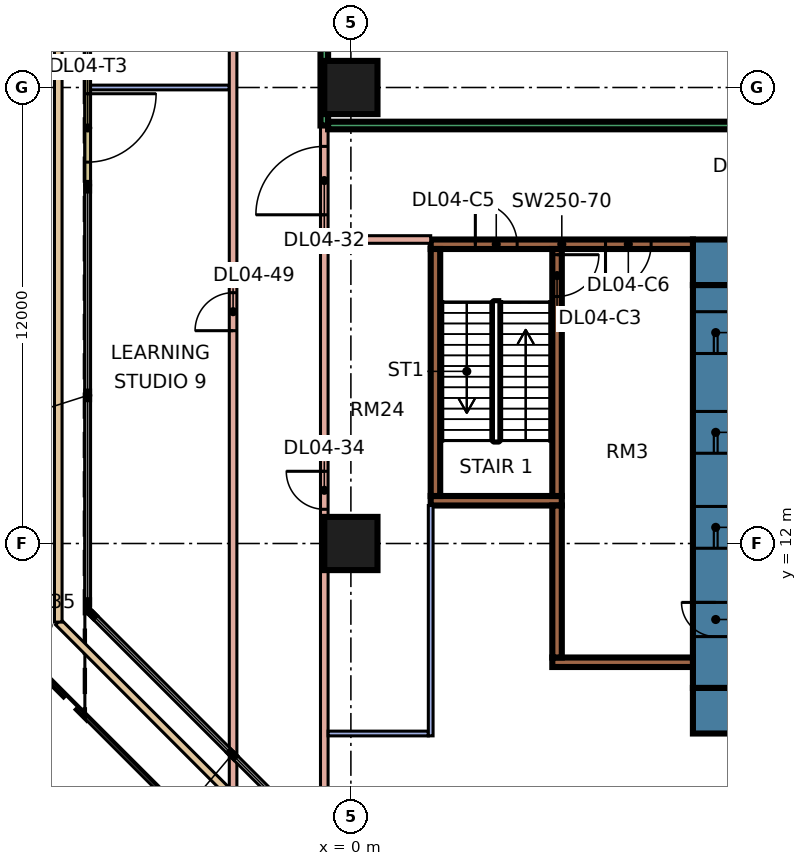
"""IFC4 building model, lengths in metres.
Left out: names, types, materials, properties, quantities, classifications, styles, units other than length and angle.
Written with IfcOpenShell. Run it as: python <this file> out.ifc"""

import sys

from ifc_helpers import new_model, si_unit, direction, frame, frame_2d, origin, origin_2d, place, context, subcontext, project, spatial, rectangle, extrude, element, fill, save


model = new_model("IFC4")
c1 = context("Model", 3, precision=1e-05, world=origin(), true_north=direction((0.0, 1.0)))
c2 = subcontext(c1, "Body", "Model", "MODEL_VIEW")
j1 = project(units=[si_unit("LENGTHUNIT", "METRE"), si_unit("PLANEANGLEUNIT", "RADIAN")], contexts=[c1])
p1 = place(None, origin())
s1 = spatial("IfcSite", under=j1, at=p1, CompositionType="ELEMENT")
p2 = place(p1, origin())
s2 = spatial("IfcBuilding", under=s1, at=p2, CompositionType="ELEMENT")
p3 = place(p2, frame((0.0, 0.0, 21.6)))
s3 = spatial("IfcBuildingStorey", under=s2, at=p3, CompositionType="ELEMENT", Elevation=21.6)
for number, where, z_axis, x_axis in (
    (1, (0.0, 12.0, 0.0), (0.0, 0.0, 1.0), (1.0, 0.0, 0.0)),
    (2, (0.0, 24.0, 0.0), (0.0, 0.0, 1.0), (1.0, 0.0, 0.0)),
):
    element("IfcColumn", number, at=place(p3, frame(where, z_axis=z_axis, x_axis=x_axis)), inside=s3, PredefinedType="COLUMN", context=c2, shape_type="SweptSolid", body=[
        extrude(rectangle(XDim=1.4, YDim=1.4, at=origin_2d()), origin(), (0.0, 0.0, 1.0), 4.8),
    ])
p4 = place(p3, frame((9.0, 7.6, 0.0), z_axis=(0.0, 0.0, 1.0), x_axis=(1.0, 0.0, 0.0)))
e3 = element("IfcWall", 3, at=p4, inside=s3, PredefinedType="SHEAR", context=c2, shape_type="SweptSolid", body=[
    extrude(rectangle(XDim=25.0, YDim=1.2, at=frame_2d((12.5, 0.0))), origin(), (0.0, 0.0, 1.0), 4.8),
])
p5 = place(p3, frame((9.0, 19.4, 0.0), z_axis=(0.0, 0.0, 1.0), x_axis=(1.0, 0.0, 0.0)))
e4 = element("IfcWall", 4, at=p5, inside=s3, PredefinedType="SHEAR", context=c2, shape_type="SweptSolid", body=[
    extrude(rectangle(XDim=25.0, YDim=1.2, at=frame_2d((12.5, 0.0))), origin(), (0.0, 0.0, 1.0), 4.8),
])
p6 = place(p5, frame((19.1, 0.0, 0.0)))
e5 = element("IfcOpeningElement", 5, at=p6, cuts=e4, PredefinedType="OPENING", context=c2, shape_type="SweptSolid", body=[
    extrude(rectangle(XDim=1.8, YDim=2.4, at=frame_2d((0.9, 1.2))), frame((0.0, 0.61, 0.0), z_axis=(0.0, -1.0, 0.0), x_axis=(1.0, 0.0, 0.0)), (0.0, 0.0, 1.0), 1.22),
])
p7 = place(p3, frame((9.6, 8.2, 0.0), z_axis=(0.0, 0.0, 1.0), x_axis=(0.0, 1.0, 0.0)))
e6 = element("IfcWall", 6, at=p7, inside=s3, PredefinedType="SHEAR", context=c2, shape_type="SweptSolid", body=[
    extrude(rectangle(XDim=10.6, YDim=1.2, at=frame_2d((5.3, 0.0))), origin(), (0.0, 0.0, 1.0), 4.8),
])
p8 = place(p7, frame((3.675, 0.0, 0.0)))
e7 = element("IfcOpeningElement", 7, at=p8, cuts=e6, PredefinedType="OPENING", context=c2, shape_type="SweptSolid", body=[
    extrude(rectangle(XDim=1.1, YDim=2.2, at=frame_2d((0.55, 1.1))), frame((0.0, 0.61, 0.0), z_axis=(0.0, -1.0, 0.0), x_axis=(1.0, 0.0, 0.0)), (0.0, 0.0, 1.0), 1.22),
])
p9 = place(p7, frame((6.175, 0.0, 0.0)))
e8 = element("IfcOpeningElement", 8, at=p9, cuts=e6, PredefinedType="OPENING", context=c2, shape_type="SweptSolid", body=[
    extrude(rectangle(XDim=1.1, YDim=2.2, at=frame_2d((0.55, 1.1))), frame((0.0, 0.61, 0.0), z_axis=(0.0, -1.0, 0.0), x_axis=(1.0, 0.0, 0.0)), (0.0, 0.0, 1.0), 1.22),
])
p10 = place(p7, frame((8.8, 0.0, 0.0)))
e9 = element("IfcOpeningElement", 9, at=p10, cuts=e6, PredefinedType="OPENING", context=c2, shape_type="SweptSolid", body=[
    extrude(rectangle(XDim=1.1, YDim=2.2, at=frame_2d((0.55, 1.1))), frame((0.0, 0.61, 0.0), z_axis=(0.0, -1.0, 0.0), x_axis=(1.0, 0.0, 0.0)), (0.0, 0.0, 1.0), 1.22),
])
p11 = place(p7, frame((1.35, 0.0, 0.0)))
e10 = element("IfcOpeningElement", 10, at=p11, cuts=e6, PredefinedType="OPENING", context=c2, shape_type="SweptSolid", body=[
    extrude(rectangle(XDim=0.9, YDim=2.1, at=frame_2d((0.45, 1.05))), frame((0.0, 0.61, 0.0), z_axis=(0.0, -1.0, 0.0), x_axis=(1.0, 0.0, 0.0)), (0.0, 0.0, 1.0), 1.22),
])
p12 = place(p3, frame((2.1, 19.875, 0.0), z_axis=(0.0, 0.0, 1.0), x_axis=(1.0, 0.0, 0.0)))
e11 = element("IfcWall", 11, at=p12, inside=s3, PredefinedType="SHEAR", context=c2, shape_type="SweptSolid", body=[
    extrude(rectangle(XDim=6.9, YDim=0.25, at=frame_2d((3.45, 0.0))), origin(), (0.0, 0.0, 1.0), 4.8),
])
p13 = place(p12, frame((1.175, 0.0, 0.0)))
e12 = element("IfcOpeningElement", 12, at=p13, cuts=e11, PredefinedType="OPENING", context=c2, shape_type="SweptSolid", body=[
    extrude(rectangle(XDim=1.1, YDim=2.2, at=frame_2d((0.55, 1.1))), frame((0.0, 0.135, 0.0), z_axis=(0.0, -1.0, 0.0), x_axis=(1.0, 0.0, 0.0)), (0.0, 0.0, 1.0), 0.27),
])
p14 = place(p12, frame((4.6, 0.0, 0.0)))
e13 = element("IfcOpeningElement", 13, at=p14, cuts=e11, PredefinedType="OPENING", context=c2, shape_type="SweptSolid", body=[
    extrude(rectangle(XDim=1.2, YDim=2.2, at=frame_2d((0.6, 1.1))), frame((0.0, 0.135, 0.0), z_axis=(0.0, -1.0, 0.0), x_axis=(1.0, 0.0, 0.0)), (0.0, 0.0, 1.0), 0.27),
])
p15 = place(p3, frame((2.1, 13.125, 0.0), z_axis=(0.0, 0.0, 1.0), x_axis=(1.0, 0.0, 0.0)))
e14 = element("IfcWall", 14, at=p15, inside=s3, PredefinedType="SHEAR", context=c2, shape_type="SweptSolid", body=[
    extrude(rectangle(XDim=3.45, YDim=0.25, at=frame_2d((1.725, 0.0))), origin(), (0.0, 0.0, 1.0), 4.8),
])
p16 = place(p3, frame((2.225, 13.25, 0.0), z_axis=(0.0, 0.0, 1.0), x_axis=(0.0, 1.0, 0.0)))
e15 = element("IfcWall", 15, at=p16, inside=s3, PredefinedType="SHEAR", context=c2, shape_type="SweptSolid", body=[
    extrude(rectangle(XDim=6.5, YDim=0.25, at=frame_2d((3.25, 0.0))), origin(), (0.0, 0.0, 1.0), 4.8),
])
p17 = place(p3, frame((5.425, 13.25, 0.0), z_axis=(0.0, 0.0, 1.0), x_axis=(0.0, 1.0, 0.0)))
e16 = element("IfcWall", 16, at=p17, inside=s3, PredefinedType="SHEAR", context=c2, shape_type="SweptSolid", body=[
    extrude(rectangle(XDim=6.5, YDim=0.25, at=frame_2d((3.25, 0.0))), origin(), (0.0, 0.0, 1.0), 4.8),
])
p18 = place(p17, frame((5.25, 0.0, 0.0)))
e17 = element("IfcOpeningElement", 17, at=p18, cuts=e16, PredefinedType="OPENING", context=c2, shape_type="SweptSolid", body=[
    extrude(rectangle(XDim=1.1, YDim=2.2, at=frame_2d((0.55, 1.1))), frame((0.0, 0.135, 0.0), z_axis=(0.0, -1.0, 0.0), x_axis=(1.0, 0.0, 0.0)), (0.0, 0.0, 1.0), 0.27),
])
p19 = place(p3, frame((5.3, 8.875, 0.0), z_axis=(0.0, 0.0, 1.0), x_axis=(1.0, 0.0, 0.0)))
e18 = element("IfcWall", 18, at=p19, inside=s3, PredefinedType="SHEAR", context=c2, shape_type="SweptSolid", body=[
    extrude(rectangle(XDim=3.7, YDim=0.25, at=frame_2d((1.85, 0.0))), origin(), (0.0, 0.0, 1.0), 4.8),
])
p20 = place(p3, frame((5.425, 9.0, 0.0), z_axis=(0.0, 0.0, 1.0), x_axis=(0.0, 1.0, 0.0)))
e19 = element("IfcWall", 19, at=p20, inside=s3, PredefinedType="SHEAR", context=c2, shape_type="SweptSolid", body=[
    extrude(rectangle(XDim=4.0, YDim=0.25, at=frame_2d((2.0, 0.0))), origin(), (0.0, 0.0, 1.0), 4.8),
])
p21 = place(p3, frame((-6.925, 24.436, 0.0), z_axis=(0.0, 0.0, 1.0), x_axis=(0.0, -1.0, 0.0)))
e20 = element("IfcWall", 20, at=p21, inside=s3, PredefinedType="SOLIDWALL", context=c2, shape_type="SweptSolid", body=[
    extrude(rectangle(XDim=3.0, YDim=0.15, at=frame_2d((1.5, 0.0))), origin(), (0.0, 0.0, 1.0), 4.4),
])
p22 = place(p21, frame((0.6, 0.0, 0.0)))
e21 = element("IfcOpeningElement", 21, at=p22, cuts=e20, PredefinedType="OPENING", context=c2, shape_type="SweptSolid", body=[
    extrude(rectangle(XDim=1.8, YDim=2.4, at=frame_2d((0.9, 1.2))), frame((0.0, 0.085, 0.0), z_axis=(0.0, -1.0, 0.0), x_axis=(1.0, 0.0, 0.0)), (0.0, 0.0, 1.0), 0.17),
])
p23 = place(p3, frame((9.932, -7.7, 0.0), z_axis=(0.0, 0.0, 1.0), x_axis=(-0.707106781187, 0.707106781187, 0.0)))
e22 = element("IfcWall", 22, at=p23, inside=s3, PredefinedType="PARAPET", context=c2, shape_type="SweptSolid", body=[
    extrude(rectangle(XDim=24.935, YDim=0.2, at=frame_2d((12.468, 0.0))), origin(), (0.0, 0.0, 1.0), 0.5),
])
p24 = place(p3, frame((-7.7, 9.932, 0.0), z_axis=(0.0, 0.0, 1.0), x_axis=(0.0, 1.0, 0.0)))
e23 = element("IfcWall", 23, at=p24, inside=s3, PredefinedType="PARAPET", context=c2, shape_type="SweptSolid", body=[
    extrude(rectangle(XDim=54.136, YDim=0.2, at=frame_2d((27.068, 0.0))), origin(), (0.0, 0.0, 1.0), 0.5),
])
p25 = place(p3, frame((-6.851, 24.0, 0.0), z_axis=(0.0, 0.0, 1.0), x_axis=(1.0, 0.0, 0.0)))
e24 = element("IfcWall", 24, at=p25, inside=s3, PredefinedType="PARTITIONING", context=c2, shape_type="SweptSolid", body=[
    extrude(rectangle(XDim=3.651, YDim=0.125, at=frame_2d((1.826, 0.0))), origin(), (0.0, 0.0, 1.0), 4.4),
])
p26 = place(p3, frame((-3.1, 5.473, 0.0), z_axis=(0.0, 0.0, 1.0), x_axis=(0.0, 1.0, 0.0)))
e25 = element("IfcWall", 25, at=p26, inside=s3, PredefinedType="PARTITIONING", context=c2, shape_type="SweptSolid", body=[
    extrude(rectangle(XDim=60.727, YDim=0.2, at=frame_2d((30.363, 0.0))), origin(), (0.0, 0.0, 1.0), 4.4),
])
p27 = place(p26, frame((12.127, 0.0, 0.0)))
e26 = element("IfcOpeningElement", 26, at=p27, cuts=e25, PredefinedType="OPENING", context=c2, shape_type="SweptSolid", body=[
    extrude(rectangle(XDim=1.0, YDim=2.1, at=frame_2d((0.5, 1.05))), frame((0.0, 0.11, 0.0), z_axis=(0.0, -1.0, 0.0), x_axis=(1.0, 0.0, 0.0)), (0.0, 0.0, 1.0), 0.22),
])
p28 = place(p26, frame((24.127, 0.0, 0.0)))
e27 = element("IfcOpeningElement", 27, at=p28, cuts=e25, PredefinedType="OPENING", context=c2, shape_type="SweptSolid", body=[
    extrude(rectangle(XDim=1.0, YDim=2.1, at=frame_2d((0.5, 1.05))), frame((0.0, 0.11, 0.0), z_axis=(0.0, -1.0, 0.0), x_axis=(1.0, 0.0, 0.0)), (0.0, 0.0, 1.0), 0.22),
])
p29 = place(p26, frame((34.627, 0.0, 0.0)))
e28 = element("IfcOpeningElement", 28, at=p29, cuts=e25, PredefinedType="OPENING", context=c2, shape_type="SweptSolid", body=[
    extrude(rectangle(XDim=1.0, YDim=2.1, at=frame_2d((0.5, 1.05))), frame((0.0, 0.11, 0.0), z_axis=(0.0, -1.0, 0.0), x_axis=(1.0, 0.0, 0.0)), (0.0, 0.0, 1.0), 0.22),
])
p30 = place(p26, frame((43.627, 0.0, 0.0)))
e29 = element("IfcOpeningElement", 29, at=p30, cuts=e25, PredefinedType="OPENING", context=c2, shape_type="SweptSolid", body=[
    extrude(rectangle(XDim=1.0, YDim=2.1, at=frame_2d((0.5, 1.05))), frame((0.0, 0.11, 0.0), z_axis=(0.0, -1.0, 0.0), x_axis=(1.0, 0.0, 0.0)), (0.0, 0.0, 1.0), 0.22),
])
p31 = place(p26, frame((52.627, 0.0, 0.0)))
e30 = element("IfcOpeningElement", 30, at=p31, cuts=e25, PredefinedType="OPENING", context=c2, shape_type="SweptSolid", body=[
    extrude(rectangle(XDim=1.0, YDim=2.1, at=frame_2d((0.5, 1.05))), frame((0.0, 0.11, 0.0), z_axis=(0.0, -1.0, 0.0), x_axis=(1.0, 0.0, 0.0)), (0.0, 0.0, 1.0), 0.22),
])
p32 = place(p3, frame((-0.7, 3.073, 0.0), z_axis=(0.0, 0.0, 1.0), x_axis=(0.0, 1.0, 0.0)))
e31 = element("IfcWall", 31, at=p32, inside=s3, PredefinedType="PARTITIONING", context=c2, shape_type="SweptSolid", body=[
    extrude(rectangle(XDim=19.927, YDim=0.2, at=frame_2d((9.963, 0.0))), origin(), (0.0, 0.0, 1.0), 4.4),
])
p33 = place(p32, frame((17.577, 0.0, 0.0)))
e32 = element("IfcOpeningElement", 32, at=p33, cuts=e31, PredefinedType="OPENING", context=c2, shape_type="SweptSolid", body=[
    extrude(rectangle(XDim=1.8, YDim=2.1, at=frame_2d((0.9, 1.05))), frame((0.0, 0.11, 0.0), z_axis=(0.0, -1.0, 0.0), x_axis=(1.0, 0.0, 0.0)), (0.0, 0.0, 1.0), 0.22),
])
p34 = place(p32, frame((9.827, 0.0, 0.0)))
e33 = element("IfcOpeningElement", 33, at=p34, cuts=e31, PredefinedType="OPENING", context=c2, shape_type="SweptSolid", body=[
    extrude(rectangle(XDim=1.0, YDim=2.1, at=frame_2d((0.5, 1.05))), frame((0.0, 0.11, 0.0), z_axis=(0.0, -1.0, 0.0), x_axis=(1.0, 0.0, 0.0)), (0.0, 0.0, 1.0), 0.22),
])
p35 = place(p3, frame((-0.7, 23.0, 0.0), z_axis=(0.0, 0.0, 1.0), x_axis=(0.0, 1.0, 0.0)))
e34 = element("IfcWall", 34, at=p35, inside=s3, PredefinedType="SOLIDWALL", context=c2, shape_type="SweptSolid", body=[
    extrude(rectangle(XDim=6.6, YDim=0.2, at=frame_2d((3.3, 0.0))), origin(), (0.0, 0.0, 1.0), 4.4),
])
p36 = place(p3, frame((-0.6, 7.0, 0.0), z_axis=(0.0, 0.0, 1.0), x_axis=(1.0, 0.0, 0.0)))
e35 = element("IfcWall", 35, at=p36, inside=s3, PredefinedType="PARTITIONING", context=c2, shape_type="SweptSolid", body=[
    extrude(rectangle(XDim=2.638, YDim=0.125, at=frame_2d((1.319, 0.0))), origin(), (0.0, 0.0, 1.0), 4.4),
])
p37 = place(p3, frame((-0.6, 20.0, 0.0), z_axis=(0.0, 0.0, 1.0), x_axis=(1.0, 0.0, 0.0)))
e36 = element("IfcWall", 36, at=p37, inside=s3, PredefinedType="PARTITIONING", context=c2, shape_type="SweptSolid", body=[
    extrude(rectangle(XDim=2.7, YDim=0.2, at=frame_2d((1.35, 0.0))), origin(), (0.0, 0.0, 1.0), 4.4),
])
p38 = place(p3, frame((-0.6, 23.0, 0.0), z_axis=(0.0, 0.0, 1.0), x_axis=(1.0, 0.0, 0.0)))
e37 = element("IfcWall", 37, at=p38, inside=s3, PredefinedType="SOLIDWALL", context=c2, shape_type="SweptSolid", body=[
    extrude(rectangle(XDim=13.3, YDim=0.2, at=frame_2d((6.65, 0.0))), origin(), (0.0, 0.0, 1.0), 4.4),
])
p39 = place(p38, frame((10.6, 0.0, 0.0)))
e38 = element("IfcOpeningElement", 38, at=p39, cuts=e37, PredefinedType="OPENING", context=c2, shape_type="SweptSolid", body=[
    extrude(rectangle(XDim=1.2, YDim=2.1, at=frame_2d((0.6, 1.05))), frame((0.0, 0.11, 0.0), z_axis=(0.0, -1.0, 0.0), x_axis=(1.0, 0.0, 0.0)), (0.0, 0.0, 1.0), 0.22),
])
p40 = place(p3, frame((2.1, 6.938, 0.0), z_axis=(0.0, 0.0, 1.0), x_axis=(0.0, 1.0, 0.0)))
e39 = element("IfcWall", 39, at=p40, inside=s3, PredefinedType="PARTITIONING", context=c2, shape_type="SweptSolid", body=[
    extrude(rectangle(XDim=6.062, YDim=0.125, at=frame_2d((3.031, 0.0))), origin(), (0.0, 0.0, 1.0), 4.4),
])
p41 = place(p22, origin())
e40 = element("IfcDoor", 40, at=p41, inside=s3, OperationType="DOUBLE_DOOR_SINGLE_SWING", PredefinedType="DOOR", context=c2, shape_type="SweptSolid", body=[
    extrude(rectangle(XDim=1.8, YDim=2.4, at=frame_2d((0.9, 1.2))), frame((0.0, 0.025, 0.0), z_axis=(0.0, -1.0, 0.0), x_axis=(1.0, 0.0, 0.0)), (0.0, 0.0, 1.0), 0.05),
])
fill(e21, e40)
p42 = place(p8, origin())
e41 = element("IfcDoor", 41, at=p42, inside=s3, OperationType="DOUBLE_DOOR_SLIDING", PredefinedType="DOOR", context=c2, shape_type="SweptSolid", body=[
    extrude(rectangle(XDim=1.1, YDim=2.2, at=frame_2d((0.55, 1.1))), frame((0.0, 0.025, 0.0), z_axis=(0.0, -1.0, 0.0), x_axis=(1.0, 0.0, 0.0)), (0.0, 0.0, 1.0), 0.05),
])
fill(e7, e41)
p43 = place(p9, origin())
e42 = element("IfcDoor", 42, at=p43, inside=s3, OperationType="DOUBLE_DOOR_SLIDING", PredefinedType="DOOR", context=c2, shape_type="SweptSolid", body=[
    extrude(rectangle(XDim=1.1, YDim=2.2, at=frame_2d((0.55, 1.1))), frame((0.0, 0.025, 0.0), z_axis=(0.0, -1.0, 0.0), x_axis=(1.0, 0.0, 0.0)), (0.0, 0.0, 1.0), 0.05),
])
fill(e8, e42)
p44 = place(p10, origin())
e43 = element("IfcDoor", 43, at=p44, inside=s3, OperationType="DOUBLE_DOOR_SLIDING", PredefinedType="DOOR", context=c2, shape_type="SweptSolid", body=[
    extrude(rectangle(XDim=1.1, YDim=2.2, at=frame_2d((0.55, 1.1))), frame((0.0, 0.025, 0.0), z_axis=(0.0, -1.0, 0.0), x_axis=(1.0, 0.0, 0.0)), (0.0, 0.0, 1.0), 0.05),
])
fill(e9, e43)
p45 = place(p18, origin())
e44 = element("IfcDoor", 44, at=p45, inside=s3, OperationType="SINGLE_SWING_RIGHT", PredefinedType="DOOR", context=c2, shape_type="SweptSolid", body=[
    extrude(rectangle(XDim=1.1, YDim=2.2, at=frame_2d((0.55, 1.1))), frame((0.0, 0.025, 0.0), z_axis=(0.0, -1.0, 0.0), x_axis=(1.0, 0.0, 0.0)), (0.0, 0.0, 1.0), 0.05),
])
fill(e17, e44)
p46 = place(p11, frame((0.9, 0.0, 0.0), z_axis=(0.0, 0.0, 1.0), x_axis=(-1.0, 0.0, 0.0)))
e45 = element("IfcDoor", 45, at=p46, inside=s3, OperationType="SINGLE_SWING_RIGHT", PredefinedType="DOOR", context=c2, shape_type="SweptSolid", body=[
    extrude(rectangle(XDim=0.9, YDim=2.1, at=frame_2d((0.45, 1.05))), frame((0.0, 0.025, 0.0), z_axis=(0.0, -1.0, 0.0), x_axis=(1.0, 0.0, 0.0)), (0.0, 0.0, 1.0), 0.05),
])
fill(e10, e45)
p47 = place(p13, origin())
e46 = element("IfcDoor", 46, at=p47, inside=s3, OperationType="SINGLE_SWING_LEFT", PredefinedType="DOOR", context=c2, shape_type="SweptSolid", body=[
    extrude(rectangle(XDim=1.1, YDim=2.2, at=frame_2d((0.55, 1.1))), frame((0.0, 0.025, 0.0), z_axis=(0.0, -1.0, 0.0), x_axis=(1.0, 0.0, 0.0)), (0.0, 0.0, 1.0), 0.05),
])
fill(e12, e46)
p48 = place(p14, frame((1.2, 0.0, 0.0), z_axis=(0.0, 0.0, 1.0), x_axis=(-1.0, 0.0, 0.0)))
e47 = element("IfcDoor", 47, at=p48, inside=s3, OperationType="SINGLE_SWING_LEFT", PredefinedType="DOOR", context=c2, shape_type="SweptSolid", body=[
    extrude(rectangle(XDim=1.2, YDim=2.2, at=frame_2d((0.6, 1.1))), frame((0.0, 0.025, 0.0), z_axis=(0.0, -1.0, 0.0), x_axis=(1.0, 0.0, 0.0)), (0.0, 0.0, 1.0), 0.05),
])
fill(e13, e47)
p49 = place(p33, origin())
e48 = element("IfcDoor", 48, at=p49, inside=s3, OperationType="DOUBLE_DOOR_SINGLE_SWING", PredefinedType="DOOR", context=c2, shape_type="SweptSolid", body=[
    extrude(rectangle(XDim=1.8, YDim=2.1, at=frame_2d((0.9, 1.05))), frame((0.0, 0.025, 0.0), z_axis=(0.0, -1.0, 0.0), x_axis=(1.0, 0.0, 0.0)), (0.0, 0.0, 1.0), 0.05),
])
fill(e32, e48)
p50 = place(p34, frame((1.0, 0.0, 0.0), z_axis=(0.0, 0.0, 1.0), x_axis=(-1.0, 0.0, 0.0)))
e49 = element("IfcDoor", 49, at=p50, inside=s3, OperationType="SINGLE_SWING_RIGHT", PredefinedType="DOOR", context=c2, shape_type="SweptSolid", body=[
    extrude(rectangle(XDim=1.0, YDim=2.1, at=frame_2d((0.5, 1.05))), frame((0.0, 0.025, 0.0), z_axis=(0.0, -1.0, 0.0), x_axis=(1.0, 0.0, 0.0)), (0.0, 0.0, 1.0), 0.05),
])
fill(e33, e49)
p51 = place(p27, origin())
e50 = element("IfcDoor", 50, at=p51, inside=s3, OperationType="SINGLE_SWING_LEFT", PredefinedType="DOOR", context=c2, shape_type="SweptSolid", body=[
    extrude(rectangle(XDim=1.0, YDim=2.1, at=frame_2d((0.5, 1.05))), frame((0.0, 0.025, 0.0), z_axis=(0.0, -1.0, 0.0), x_axis=(1.0, 0.0, 0.0)), (0.0, 0.0, 1.0), 0.05),
])
fill(e26, e50)
save(model, sys.argv[1])
